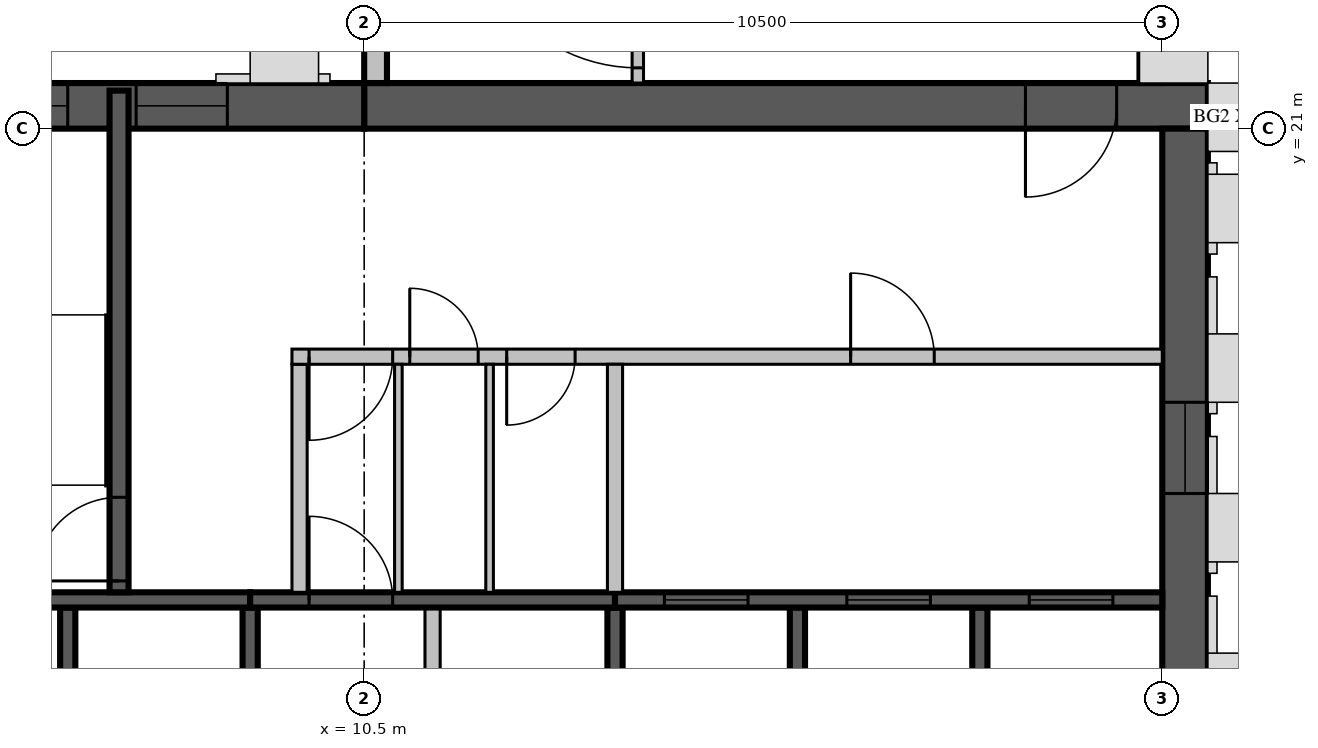
"""IFC4 building model, lengths in metres.
Left out: names, types, materials, properties, quantities, classifications, styles, units other than length and angle.
Written with IfcOpenShell. Run it as: python <this file> out.ifc"""

import sys

from ifc_helpers import new_model, si_unit, direction, frame, frame_2d, origin, place, context, subcontext, project, spatial, rectangle, extrude, source, transform, mapped, element, fill, save


model = new_model("IFC4")
c1 = context("Model", 3, precision=1e-05, world=origin(), true_north=direction((0.0, 1.0)))
c2 = subcontext(c1, "Body", "Model", "MODEL_VIEW")
j1 = project(units=[si_unit("LENGTHUNIT", "METRE"), si_unit("PLANEANGLEUNIT", "RADIAN")], contexts=[c1])
p1 = place(None, origin())
s1 = spatial("IfcSite", under=j1, at=p1, CompositionType="ELEMENT")
p2 = place(p1, origin())
s2 = spatial("IfcBuilding", under=s1, at=p2, CompositionType="ELEMENT")
p3 = place(p2, frame((0.0, 0.0, 337.0)))
s3 = spatial("IfcBuildingStorey", under=s2, at=p3, CompositionType="ELEMENT", Elevation=337.0)
m1 = source(origin(), c2, "Body", "SweptSolid", [
    extrude(rectangle(XDim=11.1, YDim=0.6, at=frame_2d((5.55, 0.0))), origin(), (0.0, 0.0, 1.0), 3.5),
])
p4 = place(p3, frame((10.5, 21.3, 0.0), z_axis=(0.0, 0.0, 1.0), x_axis=(1.0, 0.0, 0.0)))
e1 = element("IfcWall", 1, at=p4, inside=s3, PredefinedType="SHEAR", context=c2, shape_type="MappedRepresentation", body=[
    mapped(m1, transform((0.0, 0.0, 0.0), scale=1.0)),
])
m2 = source(origin(), c2, "Body", "SweptSolid", [
    extrude(rectangle(XDim=1.2, YDim=2.1, at=frame_2d((0.6, 1.05))), frame((0.0, 0.31, 0.0), z_axis=(0.0, -1.0, 0.0), x_axis=(1.0, 0.0, 0.0)), (0.0, 0.0, 1.0), 0.62),
])
p5 = place(p4, frame((8.7, 0.0, 0.0)))
e2 = element("IfcOpeningElement", 2, at=p5, cuts=e1, PredefinedType="OPENING", context=c2, shape_type="MappedRepresentation", body=[
    mapped(m2, transform((0.0, 0.0, 0.0), scale=1.0)),
])
m3 = source(origin(), c2, "Body", "SweptSolid", [
    extrude(rectangle(XDim=16.8, YDim=0.6, at=frame_2d((8.4, 0.0))), origin(), (0.0, 0.0, 1.0), 3.5),
])
p6 = place(p3, frame((21.3, 4.2, 0.0), z_axis=(0.0, 0.0, 1.0), x_axis=(0.0, 1.0, 0.0)))
e3 = element("IfcWall", 3, at=p6, inside=s3, PredefinedType="SHEAR", context=c2, shape_type="MappedRepresentation", body=[
    mapped(m3, transform((0.0, 0.0, 0.0), scale=1.0)),
])
m4 = source(origin(), c2, "Body", "SweptSolid", [
    extrude(rectangle(XDim=1.2, YDim=2.4, at=frame_2d((0.6, 1.2))), frame((0.0, 0.31, 0.0), z_axis=(0.0, -1.0, 0.0), x_axis=(1.0, 0.0, 0.0)), (0.0, 0.0, 1.0), 0.62),
])
p7 = place(p6, frame((12.0, 0.0, 0.6)))
e4 = element("IfcOpeningElement", 4, at=p7, cuts=e3, PredefinedType="OPENING", context=c2, shape_type="MappedRepresentation", body=[
    mapped(m4, transform((0.0, 0.0, 0.0), scale=1.0)),
])
m5 = source(origin(), c2, "Body", "SweptSolid", [
    extrude(rectangle(XDim=6.6, YDim=0.6, at=frame_2d((3.3, 0.0))), origin(), (0.0, 0.0, 1.0), 3.5),
])
p8 = place(p3, frame((3.9, 21.3, 0.0), z_axis=(0.0, 0.0, 1.0), x_axis=(1.0, 0.0, 0.0)))
e5 = element("IfcWall", 5, at=p8, inside=s3, PredefinedType="SHEAR", context=c2, shape_type="MappedRepresentation", body=[
    mapped(m5, transform((0.0, 0.0, 0.0), scale=1.0)),
])
p9 = place(p8, frame((1.5, 0.0, 0.6)))
e6 = element("IfcOpeningElement", 6, at=p9, cuts=e5, PredefinedType="OPENING", context=c2, shape_type="MappedRepresentation", body=[
    mapped(m4, transform((0.0, 0.0, 0.0), scale=1.0)),
])
p10 = place(p8, frame((3.6, 0.0, 0.6)))
e7 = element("IfcOpeningElement", 7, at=p10, cuts=e5, PredefinedType="OPENING", context=c2, shape_type="MappedRepresentation", body=[
    mapped(m4, transform((0.0, 0.0, 0.0), scale=1.0)),
])
m6 = source(origin(), c2, "Body", "SweptSolid", [
    extrude(rectangle(XDim=7.5, YDim=0.3, at=frame_2d((3.75, 0.0))), origin(), (0.0, 0.0, 1.0), 3.1),
])
p11 = place(p3, frame((20.85, 21.6, 0.0), z_axis=(0.0, 0.0, 1.0), x_axis=(0.0, 1.0, 0.0)))
e8 = element("IfcWall", 8, at=p11, inside=s3, PredefinedType="STANDARD", context=c2, shape_type="MappedRepresentation", body=[
    mapped(m6, transform((0.0, 0.0, 0.0), scale=1.0)),
])
m7 = source(origin(), c2, "Body", "SweptSolid", [
    extrude(rectangle(XDim=1.8, YDim=2.0, at=frame_2d((0.9, 1.0))), frame((0.0, 0.16, 0.0), z_axis=(0.0, -1.0, 0.0), x_axis=(1.0, 0.0, 0.0)), (0.0, 0.0, 1.0), 0.32),
])
p12 = place(p11, frame((0.463, 0.0, 0.6)))
e9 = element("IfcOpeningElement", 9, at=p12, cuts=e8, PredefinedType="OPENING", context=c2, shape_type="MappedRepresentation", body=[
    mapped(m7, transform((0.0, 0.0, 0.0), scale=1.0)),
])
m8 = source(origin(), c2, "Body", "SweptSolid", [
    extrude(rectangle(XDim=3.0, YDim=2.0, at=frame_2d((1.5, 1.0))), frame((0.0, 0.16, 0.0), z_axis=(0.0, -1.0, 0.0), x_axis=(1.0, 0.0, 0.0)), (0.0, 0.0, 1.0), 0.32),
])
p13 = place(p11, frame((4.2, 0.0, 0.6)))
e10 = element("IfcOpeningElement", 10, at=p13, cuts=e8, PredefinedType="OPENING", context=c2, shape_type="MappedRepresentation", body=[
    mapped(m8, transform((0.0, 0.0, 0.0), scale=1.0)),
])
p14 = place(p3, frame((10.65, 29.1, 0.0), z_axis=(0.0, 0.0, 1.0), x_axis=(0.0, -1.0, 0.0)))
e11 = element("IfcWall", 11, at=p14, inside=s3, PredefinedType="STANDARD", context=c2, shape_type="MappedRepresentation", body=[
    mapped(m6, transform((0.0, 0.0, 0.0), scale=1.0)),
])
m9 = source(origin(), c2, "Body", "SweptSolid", [
    extrude(rectangle(XDim=3.6, YDim=2.0, at=frame_2d((1.8, 1.0))), frame((0.0, 0.16, 0.0), z_axis=(0.0, -1.0, 0.0), x_axis=(1.0, 0.0, 0.0)), (0.0, 0.0, 1.0), 0.32),
])
p15 = place(p14, frame((3.36, 0.0, 0.6)))
e12 = element("IfcOpeningElement", 12, at=p15, cuts=e11, PredefinedType="OPENING", context=c2, shape_type="MappedRepresentation", body=[
    mapped(m9, transform((0.0, 0.0, 0.0), scale=1.0)),
])
m10 = source(origin(), c2, "Body", "SweptSolid", [
    extrude(rectangle(XDim=2.4, YDim=2.0, at=frame_2d((1.2, 1.0))), frame((0.0, 0.16, 0.0), z_axis=(0.0, -1.0, 0.0), x_axis=(1.0, 0.0, 0.0)), (0.0, 0.0, 1.0), 0.32),
])
p16 = place(p14, frame((0.48, 0.0, 0.6)))
e13 = element("IfcOpeningElement", 13, at=p16, cuts=e11, PredefinedType="OPENING", context=c2, shape_type="MappedRepresentation", body=[
    mapped(m10, transform((0.0, 0.0, 0.0), scale=1.0)),
])
m11 = source(origin(), c2, "Body", "SweptSolid", [
    extrude(rectangle(XDim=3.0, YDim=0.2, at=frame_2d((1.5, 0.0))), origin(), (0.0, 0.0, 1.0), 3.5),
])
p17 = place(p3, frame((6.6, 11.7, 0.0), z_axis=(0.0, 0.0, 1.0), x_axis=(0.0, 1.0, 0.0)))
e14 = element("IfcWall", 14, at=p17, inside=s3, PredefinedType="SOLIDWALL", context=c2, shape_type="MappedRepresentation", body=[
    mapped(m11, transform((0.0, 0.0, 0.0), scale=1.0)),
])
m12 = source(origin(), c2, "Body", "SweptSolid", [
    extrude(rectangle(XDim=3.0, YDim=0.2, at=frame_2d((1.5, 0.0))), origin(), (0.0, 0.0, 1.0), 3.1),
])
for number, where, z_axis, x_axis in (
    (15, (9.0, 11.7, 0.0), (0.0, 0.0, 1.0), (0.0, 1.0, 0.0)),
    (16, (13.8, 11.7, 0.0), (0.0, 0.0, 1.0), (0.0, 1.0, 0.0)),
):
    element("IfcWall", number, at=place(p3, frame(where, z_axis=z_axis, x_axis=x_axis)), inside=s3, PredefinedType="SOLIDWALL", context=c2, shape_type="MappedRepresentation", body=[
        mapped(m12, transform((0.0, 0.0, 0.0), scale=1.0)),
    ])
for number, where, z_axis, x_axis in (
    (17, (16.2, 11.7, 0.0), (0.0, 0.0, 1.0), (0.0, 1.0, 0.0)),
    (18, (18.6, 11.7, 0.0), (0.0, 0.0, 1.0), (0.0, 1.0, 0.0)),
):
    element("IfcWall", number, at=place(p3, frame(where, z_axis=z_axis, x_axis=x_axis)), inside=s3, PredefinedType="SOLIDWALL", context=c2, shape_type="MappedRepresentation", body=[
        mapped(m11, transform((0.0, 0.0, 0.0), scale=1.0)),
    ])
m13 = source(origin(), c2, "Body", "SweptSolid", [
    extrude(rectangle(XDim=3.0, YDim=0.2, at=frame_2d((1.5, 0.0))), origin(), (0.0, 0.0, 1.0), 3.1),
])
p18 = place(p3, frame((11.4, 11.7, 0.0), z_axis=(0.0, 0.0, 1.0), x_axis=(0.0, 1.0, 0.0)))
e19 = element("IfcWall", 19, at=p18, inside=s3, PredefinedType="PARTITIONING", context=c2, shape_type="MappedRepresentation", body=[
    mapped(m13, transform((0.0, 0.0, 0.0), scale=1.0)),
])
m14 = source(origin(), c2, "Body", "SweptSolid", [
    extrude(rectangle(XDim=4.8, YDim=0.2, at=frame_2d((2.4, 0.0))), origin(), (0.0, 0.0, 1.0), 3.5),
])
p19 = place(p3, frame((4.2, 14.8, 0.0), z_axis=(0.0, 0.0, 1.0), x_axis=(1.0, 0.0, 0.0)))
e20 = element("IfcWall", 20, at=p19, inside=s3, PredefinedType="SOLIDWALL", context=c2, shape_type="MappedRepresentation", body=[
    mapped(m14, transform((0.0, 0.0, 0.0), scale=1.0)),
])
m15 = source(origin(), c2, "Body", "SweptSolid", [
    extrude(rectangle(XDim=4.8, YDim=0.2, at=frame_2d((2.4, 0.0))), origin(), (0.0, 0.0, 1.0), 3.1),
])
p20 = place(p3, frame((9.0, 14.8, 0.0), z_axis=(0.0, 0.0, 1.0), x_axis=(1.0, 0.0, 0.0)))
e21 = element("IfcWall", 21, at=p20, inside=s3, PredefinedType="SOLIDWALL", context=c2, shape_type="MappedRepresentation", body=[
    mapped(m15, transform((0.0, 0.0, 0.0), scale=1.0)),
])
m16 = source(origin(), c2, "Body", "SweptSolid", [
    extrude(rectangle(XDim=1.1, YDim=2.1, at=frame_2d((0.55, 1.05))), frame((0.0, 0.11, 0.0), z_axis=(0.0, -1.0, 0.0), x_axis=(1.0, 0.0, 0.0)), (0.0, 0.0, 1.0), 0.22),
])
p21 = place(p20, frame((0.775, 0.0, 0.0)))
e22 = element("IfcOpeningElement", 22, at=p21, cuts=e21, PredefinedType="OPENING", context=c2, shape_type="MappedRepresentation", body=[
    mapped(m16, transform((0.0, 0.0, 0.0), scale=1.0)),
])
m17 = source(origin(), c2, "Body", "SweptSolid", [
    extrude(rectangle(XDim=7.2, YDim=0.2, at=frame_2d((3.6, 0.0))), origin(), (0.0, 0.0, 1.0), 3.5),
])
p22 = place(p3, frame((13.8, 14.8, 0.0), z_axis=(0.0, 0.0, 1.0), x_axis=(1.0, 0.0, 0.0)))
e23 = element("IfcWall", 23, at=p22, inside=s3, PredefinedType="SOLIDWALL", context=c2, shape_type="MappedRepresentation", body=[
    mapped(m17, transform((0.0, 0.0, 0.0), scale=1.0)),
])
p23 = place(p22, frame((0.65, 0.0, 0.0)))
e24 = element("IfcOpeningElement", 24, at=p23, cuts=e23, PredefinedType="OPENING", context=c2, shape_type="MappedRepresentation", body=[
    mapped(m16, transform((0.0, 0.0, 0.0), scale=1.0)),
])
p24 = place(p22, frame((3.05, 0.0, 0.0)))
e25 = element("IfcOpeningElement", 25, at=p24, cuts=e23, PredefinedType="OPENING", context=c2, shape_type="MappedRepresentation", body=[
    mapped(m16, transform((0.0, 0.0, 0.0), scale=1.0)),
])
p25 = place(p22, frame((5.45, 0.0, 0.0)))
e26 = element("IfcOpeningElement", 26, at=p25, cuts=e23, PredefinedType="OPENING", context=c2, shape_type="MappedRepresentation", body=[
    mapped(m16, transform((0.0, 0.0, 0.0), scale=1.0)),
])
m18 = source(origin(), c2, "Body", "SweptSolid", [
    extrude(rectangle(XDim=6.6, YDim=0.25, at=frame_2d((3.3, 0.0))), origin(), (0.0, 0.0, 1.0), 3.1),
])
p26 = place(p3, frame((7.275, 14.9, 0.0), z_axis=(0.0, 0.0, 1.0), x_axis=(0.0, 1.0, 0.0)))
e27 = element("IfcWall", 27, at=p26, inside=s3, PredefinedType="SOLIDWALL", context=c2, shape_type="MappedRepresentation", body=[
    mapped(m18, transform((0.0, 0.0, 0.0), scale=1.0)),
])
m19 = source(origin(), c2, "Body", "SweptSolid", [
    extrude(rectangle(XDim=1.1, YDim=2.1, at=frame_2d((0.55, 1.05))), frame((0.0, 0.135, 0.0), z_axis=(0.0, -1.0, 0.0), x_axis=(1.0, 0.0, 0.0)), (0.0, 0.0, 1.0), 0.27),
])
p27 = place(p26, frame((0.15, 0.0, 0.0)))
e28 = element("IfcOpeningElement", 28, at=p27, cuts=e27, PredefinedType="OPENING", context=c2, shape_type="MappedRepresentation", body=[
    mapped(m19, transform((0.0, 0.0, 0.0), scale=1.0)),
])
p28 = place(p3, frame((9.65, 14.9, 0.0), z_axis=(0.0, 0.0, 1.0), x_axis=(0.0, 1.0, 0.0)))
e29 = element("IfcWall", 29, at=p28, inside=s3, PredefinedType="PARTITIONING", context=c2, shape_type="MappedRepresentation", body=[
    mapped(m13, transform((0.0, 0.0, 0.0), scale=1.0)),
])
m20 = source(origin(), c2, "Body", "SweptSolid", [
    extrude(rectangle(XDim=11.45, YDim=0.2, at=frame_2d((5.725, 0.0))), origin(), (0.0, 0.0, 1.0), 3.1),
])
p29 = place(p3, frame((9.55, 18.0, 0.0), z_axis=(0.0, 0.0, 1.0), x_axis=(1.0, 0.0, 0.0)))
e30 = element("IfcWall", 30, at=p29, inside=s3, PredefinedType="PARTITIONING", context=c2, shape_type="MappedRepresentation", body=[
    mapped(m20, transform((0.0, 0.0, 0.0), scale=1.0)),
])
p30 = place(p29, frame((0.225, 0.0, 0.0)))
e31 = element("IfcOpeningElement", 31, at=p30, cuts=e30, PredefinedType="OPENING", context=c2, shape_type="MappedRepresentation", body=[
    mapped(m16, transform((0.0, 0.0, 0.0), scale=1.0)),
])
m21 = source(origin(), c2, "Body", "SweptSolid", [
    extrude(rectangle(XDim=0.9, YDim=2.1, at=frame_2d((0.45, 1.05))), frame((0.0, 0.11, 0.0), z_axis=(0.0, -1.0, 0.0), x_axis=(1.0, 0.0, 0.0)), (0.0, 0.0, 1.0), 0.22),
])
p31 = place(p29, frame((1.55, 0.0, 0.0)))
e32 = element("IfcOpeningElement", 32, at=p31, cuts=e30, PredefinedType="OPENING", context=c2, shape_type="MappedRepresentation", body=[
    mapped(m21, transform((0.0, 0.0, 0.0), scale=1.0)),
])
p32 = place(p29, frame((2.825, 0.0, 0.0)))
e33 = element("IfcOpeningElement", 33, at=p32, cuts=e30, PredefinedType="OPENING", context=c2, shape_type="MappedRepresentation", body=[
    mapped(m21, transform((0.0, 0.0, 0.0), scale=1.0)),
])
p33 = place(p29, frame((7.35, 0.0, 0.0)))
e34 = element("IfcOpeningElement", 34, at=p33, cuts=e30, PredefinedType="OPENING", context=c2, shape_type="MappedRepresentation", body=[
    mapped(m16, transform((0.0, 0.0, 0.0), scale=1.0)),
])
p34 = place(p3, frame((13.8, 14.9, 0.0), z_axis=(0.0, 0.0, 1.0), x_axis=(0.0, 1.0, 0.0)))
e35 = element("IfcWall", 35, at=p34, inside=s3, PredefinedType="PARTITIONING", context=c2, shape_type="MappedRepresentation", body=[
    mapped(m13, transform((0.0, 0.0, 0.0), scale=1.0)),
])
m22 = source(origin(), c2, "Body", "SweptSolid", [
    extrude(rectangle(XDim=3.0, YDim=0.1, at=frame_2d((1.5, 0.0))), origin(), (0.0, 0.0, 1.0), 3.1),
])
for number, where, z_axis, x_axis in (
    (36, (10.95, 14.9, 0.0), (0.0, 0.0, 1.0), (0.0, 1.0, 0.0)),
    (37, (12.15, 14.9, 0.0), (0.0, 0.0, 1.0), (0.0, 1.0, 0.0)),
):
    element("IfcWall", number, at=place(p3, frame(where, z_axis=z_axis, x_axis=x_axis)), inside=s3, PredefinedType="PARTITIONING", context=c2, shape_type="MappedRepresentation", body=[
        mapped(m22, transform((0.0, 0.0, 0.0), scale=1.0)),
    ])
m23 = source(origin(), c2, "Body", "SweptSolid", [
    extrude(rectangle(XDim=7.725, YDim=0.15, at=frame_2d((3.862, 0.0))), origin(), (0.0, 0.0, 1.0), 3.1),
])
p35 = place(p3, frame((14.1, 29.325, 0.0), z_axis=(0.0, 0.0, 1.0), x_axis=(0.0, -1.0, 0.0)))
e38 = element("IfcWall", 38, at=p35, inside=s3, PredefinedType="PARTITIONING", context=c2, shape_type="MappedRepresentation", body=[
    mapped(m23, transform((0.0, 0.0, 0.0), scale=1.0)),
])
m24 = source(origin(), c2, "Body", "SweptSolid", [
    extrude(rectangle(XDim=2.2, YDim=2.1, at=frame_2d((1.1, 1.05))), frame((0.0, 0.085, 0.0), z_axis=(0.0, -1.0, 0.0), x_axis=(1.0, 0.0, 0.0)), (0.0, 0.0, 1.0), 0.17),
])
p36 = place(p35, frame((5.325, 0.0, 0.0)))
e39 = element("IfcOpeningElement", 39, at=p36, cuts=e38, PredefinedType="OPENING", context=c2, shape_type="MappedRepresentation", body=[
    mapped(m24, transform((0.0, 0.0, 0.0), scale=1.0)),
])
m25 = source(origin(), c2, "Body", "SweptSolid", [
    extrude(rectangle(XDim=1.1, YDim=2.1, at=frame_2d((0.55, 1.05))), frame((0.0, 0.025, 0.0), z_axis=(0.0, -1.0, 0.0), x_axis=(1.0, 0.0, 0.0)), (0.0, 0.0, 1.0), 0.05),
])
p37 = place(p21, origin())
e40 = element("IfcDoor", 40, at=p37, inside=s3, OperationType="SINGLE_SWING_LEFT", PredefinedType="DOOR", context=c2, shape_type="MappedRepresentation", body=[
    mapped(m25, transform((0.0, 0.0, 0.0), scale=1.0)),
])
fill(e22, e40)
p38 = place(p23, origin())
e41 = element("IfcDoor", 41, at=p38, inside=s3, OperationType="SLIDING_TO_LEFT", PredefinedType="DOOR", context=c2, shape_type="MappedRepresentation", body=[
    mapped(m25, transform((0.0, 0.0, 0.0), scale=1.0)),
])
fill(e24, e41)
p39 = place(p24, origin())
e42 = element("IfcDoor", 42, at=p39, inside=s3, OperationType="SLIDING_TO_LEFT", PredefinedType="DOOR", context=c2, shape_type="MappedRepresentation", body=[
    mapped(m25, transform((0.0, 0.0, 0.0), scale=1.0)),
])
fill(e25, e42)
p40 = place(p25, origin())
e43 = element("IfcDoor", 43, at=p40, inside=s3, OperationType="SLIDING_TO_LEFT", PredefinedType="DOOR", context=c2, shape_type="MappedRepresentation", body=[
    mapped(m25, transform((0.0, 0.0, 0.0), scale=1.0)),
])
fill(e26, e43)
p41 = place(p27, origin())
e44 = element("IfcDoor", 44, at=p41, inside=s3, OperationType="SINGLE_SWING_LEFT", PredefinedType="DOOR", context=c2, shape_type="MappedRepresentation", body=[
    mapped(m25, transform((0.0, 0.0, 0.0), scale=1.0)),
])
fill(e28, e44)
p42 = place(p30, origin())
e45 = element("IfcDoor", 45, at=p42, inside=s3, OperationType="SINGLE_SWING_RIGHT", PredefinedType="DOOR", context=c2, shape_type="MappedRepresentation", body=[
    mapped(m25, transform((0.0, 0.0, 0.0), scale=1.0)),
])
fill(e31, e45)
m26 = source(origin(), c2, "Body", "SweptSolid", [
    extrude(rectangle(XDim=0.9, YDim=2.1, at=frame_2d((0.45, 1.05))), frame((0.0, 0.025, 0.0), z_axis=(0.0, -1.0, 0.0), x_axis=(1.0, 0.0, 0.0)), (0.0, 0.0, 1.0), 0.05),
])
p43 = place(p31, origin())
e46 = element("IfcDoor", 46, at=p43, inside=s3, OperationType="SINGLE_SWING_LEFT", PredefinedType="DOOR", context=c2, shape_type="MappedRepresentation", body=[
    mapped(m26, transform((0.0, 0.0, 0.0), scale=1.0)),
])
fill(e32, e46)
p44 = place(p32, origin())
e47 = element("IfcDoor", 47, at=p44, inside=s3, OperationType="SINGLE_SWING_RIGHT", PredefinedType="DOOR", context=c2, shape_type="MappedRepresentation", body=[
    mapped(m26, transform((0.0, 0.0, 0.0), scale=1.0)),
])
fill(e33, e47)
p45 = place(p33, origin())
e48 = element("IfcDoor", 48, at=p45, inside=s3, OperationType="SINGLE_SWING_LEFT", PredefinedType="DOOR", context=c2, shape_type="MappedRepresentation", body=[
    mapped(m25, transform((0.0, 0.0, 0.0), scale=1.0)),
])
fill(e34, e48)
m27 = source(origin(), c2, "Body", "SweptSolid", [
    extrude(rectangle(XDim=1.2, YDim=2.1, at=frame_2d((0.6, 1.05))), frame((0.0, 0.025, 0.0), z_axis=(0.0, -1.0, 0.0), x_axis=(1.0, 0.0, 0.0)), (0.0, 0.0, 1.0), 0.05),
])
p46 = place(p5, origin())
e49 = element("IfcDoor", 49, at=p46, inside=s3, OperationType="SINGLE_SWING_RIGHT", PredefinedType="DOOR", context=c2, shape_type="MappedRepresentation", body=[
    mapped(m27, transform((0.0, 0.0, 0.0), scale=1.0)),
])
fill(e2, e49)
m28 = source(origin(), c2, "Body", "SweptSolid", [
    extrude(rectangle(XDim=1.2, YDim=2.4, at=frame_2d((0.6, 1.2))), frame((0.0, 0.03, 0.0), z_axis=(0.0, -1.0, 0.0), x_axis=(1.0, 0.0, 0.0)), (0.0, 0.0, 1.0), 0.06),
])
p47 = place(p7, origin())
e50 = element("IfcWindow", 50, at=p47, inside=s3, PartitioningType="SINGLE_PANEL", PredefinedType="WINDOW", context=c2, shape_type="MappedRepresentation", body=[
    mapped(m28, transform((0.0, 0.0, 0.0), scale=1.0)),
])
fill(e4, e50)
p48 = place(p9, origin())
e51 = element("IfcWindow", 51, at=p48, inside=s3, PartitioningType="SINGLE_PANEL", PredefinedType="WINDOW", context=c2, shape_type="MappedRepresentation", body=[
    mapped(m28, transform((0.0, 0.0, 0.0), scale=1.0)),
])
fill(e6, e51)
p49 = place(p10, origin())
e52 = element("IfcWindow", 52, at=p49, inside=s3, PartitioningType="SINGLE_PANEL", PredefinedType="WINDOW", context=c2, shape_type="MappedRepresentation", body=[
    mapped(m28, transform((0.0, 0.0, 0.0), scale=1.0)),
])
fill(e7, e52)
m29 = source(origin(), c2, "Body", "SweptSolid", [
    extrude(rectangle(XDim=2.2, YDim=2.1, at=frame_2d((1.1, 1.05))), frame((0.0, 0.025, 0.0), z_axis=(0.0, -1.0, 0.0), x_axis=(1.0, 0.0, 0.0)), (0.0, 0.0, 1.0), 0.05),
])
p50 = place(p36, origin())
e53 = element("IfcDoor", 53, at=p50, inside=s3, OperationType="DOUBLE_DOOR_SINGLE_SWING", PredefinedType="DOOR", context=c2, shape_type="MappedRepresentation", body=[
    mapped(m29, transform((0.0, 0.0, 0.0), scale=1.0)),
])
fill(e39, e53)
save(model, sys.argv[1])
